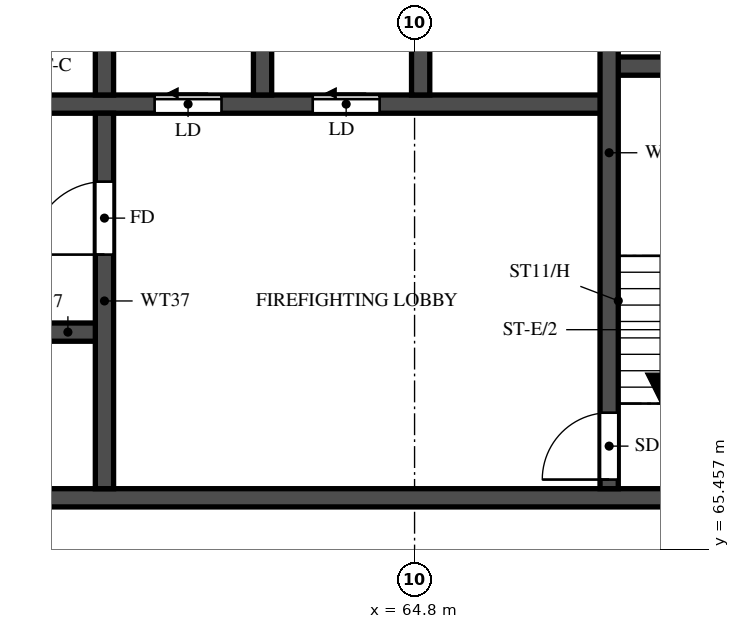
"""IFC4 building model, lengths in metres.
Left out: names, types, materials, properties, quantities, classifications, styles, units other than length and angle.
Written with IfcOpenShell. Run it as: python <this file> out.ifc"""

import sys

from ifc_helpers import new_model, si_unit, direction, frame, frame_2d, origin, place, context, subcontext, project, spatial, rectangle, extrude, element, fill, save


model = new_model("IFC4")
c1 = context("Model", 3, precision=1e-05, world=origin(), true_north=direction((0.0, 1.0)))
c2 = subcontext(c1, "Body", "Model", "MODEL_VIEW")
j1 = project(units=[si_unit("LENGTHUNIT", "METRE"), si_unit("PLANEANGLEUNIT", "RADIAN")], contexts=[c1])
p1 = place(None, origin())
s1 = spatial("IfcSite", under=j1, at=p1, CompositionType="ELEMENT")
p2 = place(p1, origin())
s2 = spatial("IfcBuilding", under=s1, at=p2, CompositionType="ELEMENT")
p3 = place(p2, frame((0.0, 0.0, 222.0)))
s3 = spatial("IfcBuildingStorey", under=s2, at=p3, CompositionType="ELEMENT", Elevation=222.0)
p4 = place(p3, frame((29.2, 66.3, 0.0), z_axis=(0.0, 0.0, 1.0), x_axis=(1.0, 0.0, 0.0)))
e1 = element("IfcWall", 1, at=p4, inside=s3, PredefinedType="SHEAR", context=c2, shape_type="SweptSolid", body=[
    extrude(rectangle(XDim=42.4, YDim=0.3, at=frame_2d((21.2, 0.0))), origin(), (0.0, 0.0, 1.0), 3.22),
])
p5 = place(p4, frame((1.425, 0.0, 0.0)))
e2 = element("IfcOpeningElement", 2, at=p5, cuts=e1, PredefinedType="OPENING", context=c2, shape_type="SweptSolid", body=[
    extrude(rectangle(XDim=1.1, YDim=2.1, at=frame_2d((0.55, 1.05))), frame((0.0, 0.16, 0.0), z_axis=(0.0, -1.0, 0.0), x_axis=(1.0, 0.0, 0.0)), (0.0, 0.0, 1.0), 0.32),
])
p6 = place(p4, frame((4.2, 0.0, 0.0)))
e3 = element("IfcOpeningElement", 3, at=p6, cuts=e1, PredefinedType="OPENING", context=c2, shape_type="SweptSolid", body=[
    extrude(rectangle(XDim=1.8, YDim=2.1, at=frame_2d((0.9, 1.05))), frame((0.0, 0.16, 0.0), z_axis=(0.0, -1.0, 0.0), x_axis=(1.0, 0.0, 0.0)), (0.0, 0.0, 1.0), 0.32),
])
p7 = place(p3, frame((35.65, 69.025, 0.0), z_axis=(0.0, 0.0, 1.0), x_axis=(1.0, 0.0, 0.0)))
e4 = element("IfcWall", 4, at=p7, inside=s3, PredefinedType="SHEAR", context=c2, shape_type="SweptSolid", body=[
    extrude(rectangle(XDim=24.05, YDim=0.3, at=frame_2d((12.025, 0.0))), origin(), (0.0, 0.0, 1.0), 3.22),
])
p8 = place(p7, frame((0.975, 0.0, 0.0)))
e5 = element("IfcOpeningElement", 5, at=p8, cuts=e4, PredefinedType="OPENING", context=c2, shape_type="SweptSolid", body=[
    extrude(rectangle(XDim=1.1, YDim=2.1, at=frame_2d((0.55, 1.05))), frame((0.0, 0.16, 0.0), z_axis=(0.0, -1.0, 0.0), x_axis=(1.0, 0.0, 0.0)), (0.0, 0.0, 1.0), 0.32),
])
p9 = place(p7, frame((3.725, 0.0, 0.0)))
e6 = element("IfcOpeningElement", 6, at=p9, cuts=e4, PredefinedType="OPENING", context=c2, shape_type="SweptSolid", body=[
    extrude(rectangle(XDim=1.1, YDim=2.1, at=frame_2d((0.55, 1.05))), frame((0.0, 0.16, 0.0), z_axis=(0.0, -1.0, 0.0), x_axis=(1.0, 0.0, 0.0)), (0.0, 0.0, 1.0), 0.32),
])
p10 = place(p7, frame((6.475, 0.0, 0.0)))
e7 = element("IfcOpeningElement", 7, at=p10, cuts=e4, PredefinedType="OPENING", context=c2, shape_type="SweptSolid", body=[
    extrude(rectangle(XDim=1.1, YDim=2.1, at=frame_2d((0.55, 1.05))), frame((0.0, 0.16, 0.0), z_axis=(0.0, -1.0, 0.0), x_axis=(1.0, 0.0, 0.0)), (0.0, 0.0, 1.0), 0.32),
])
p11 = place(p7, frame((9.225, 0.0, 0.0)))
e8 = element("IfcOpeningElement", 8, at=p11, cuts=e4, PredefinedType="OPENING", context=c2, shape_type="SweptSolid", body=[
    extrude(rectangle(XDim=1.1, YDim=2.1, at=frame_2d((0.55, 1.05))), frame((0.0, 0.16, 0.0), z_axis=(0.0, -1.0, 0.0), x_axis=(1.0, 0.0, 0.0)), (0.0, 0.0, 1.0), 0.32),
])
p12 = place(p7, frame((11.975, 0.0, 0.0)))
e9 = element("IfcOpeningElement", 9, at=p12, cuts=e4, PredefinedType="OPENING", context=c2, shape_type="SweptSolid", body=[
    extrude(rectangle(XDim=1.1, YDim=2.1, at=frame_2d((0.55, 1.05))), frame((0.0, 0.16, 0.0), z_axis=(0.0, -1.0, 0.0), x_axis=(1.0, 0.0, 0.0)), (0.0, 0.0, 1.0), 0.32),
])
p13 = place(p7, frame((14.725, 0.0, 0.0)))
e10 = element("IfcOpeningElement", 10, at=p13, cuts=e4, PredefinedType="OPENING", context=c2, shape_type="SweptSolid", body=[
    extrude(rectangle(XDim=1.1, YDim=2.1, at=frame_2d((0.55, 1.05))), frame((0.0, 0.16, 0.0), z_axis=(0.0, -1.0, 0.0), x_axis=(1.0, 0.0, 0.0)), (0.0, 0.0, 1.0), 0.32),
])
p14 = place(p7, frame((17.6, 0.0, 0.0)))
e11 = element("IfcOpeningElement", 11, at=p14, cuts=e4, PredefinedType="OPENING", context=c2, shape_type="SweptSolid", body=[
    extrude(rectangle(XDim=1.1, YDim=2.1, at=frame_2d((0.55, 1.05))), frame((0.0, 0.16, 0.0), z_axis=(0.0, -1.0, 0.0), x_axis=(1.0, 0.0, 0.0)), (0.0, 0.0, 1.0), 0.32),
])
p15 = place(p7, frame((20.6, 0.0, 0.0)))
e12 = element("IfcOpeningElement", 12, at=p15, cuts=e4, PredefinedType="OPENING", context=c2, shape_type="SweptSolid", body=[
    extrude(rectangle(XDim=1.1, YDim=2.1, at=frame_2d((0.55, 1.05))), frame((0.0, 0.16, 0.0), z_axis=(0.0, -1.0, 0.0), x_axis=(1.0, 0.0, 0.0)), (0.0, 0.0, 1.0), 0.32),
])
p16 = place(p3, frame((32.8, 72.775, 0.0), z_axis=(0.0, 0.0, 1.0), x_axis=(1.0, 0.0, 0.0)))
e13 = element("IfcWall", 13, at=p16, inside=s3, PredefinedType="SHEAR", context=c2, shape_type="SweptSolid", body=[
    extrude(rectangle(XDim=35.2, YDim=0.3, at=frame_2d((17.6, 0.0))), origin(), (0.0, 0.0, 1.0), 3.22),
])
p17 = place(p16, frame((19.8, 0.0, 0.0)))
e14 = element("IfcOpeningElement", 14, at=p17, cuts=e13, PredefinedType="OPENING", context=c2, shape_type="SweptSolid", body=[
    extrude(rectangle(XDim=1.1, YDim=2.1, at=frame_2d((0.55, 1.05))), frame((0.0, 0.16, 0.0), z_axis=(0.0, -1.0, 0.0), x_axis=(1.0, 0.0, 0.0)), (0.0, 0.0, 1.0), 0.32),
])
p18 = place(p16, frame((27.725, 0.0, 0.0)))
e15 = element("IfcOpeningElement", 15, at=p18, cuts=e13, PredefinedType="OPENING", context=c2, shape_type="SweptSolid", body=[
    extrude(rectangle(XDim=1.1, YDim=2.1, at=frame_2d((0.55, 1.05))), frame((0.0, 0.16, 0.0), z_axis=(0.0, -1.0, 0.0), x_axis=(1.0, 0.0, 0.0)), (0.0, 0.0, 1.0), 0.32),
])
p19 = place(p16, frame((30.325, 0.0, 0.0)))
e16 = element("IfcOpeningElement", 16, at=p19, cuts=e13, PredefinedType="OPENING", context=c2, shape_type="SweptSolid", body=[
    extrude(rectangle(XDim=1.1, YDim=2.1, at=frame_2d((0.55, 1.05))), frame((0.0, 0.16, 0.0), z_axis=(0.0, -1.0, 0.0), x_axis=(1.0, 0.0, 0.0)), (0.0, 0.0, 1.0), 0.32),
])
p20 = place(p16, frame((3.825, 0.0, 0.0)))
e17 = element("IfcOpeningElement", 17, at=p20, cuts=e13, PredefinedType="OPENING", context=c2, shape_type="SweptSolid", body=[
    extrude(rectangle(XDim=1.1, YDim=2.1, at=frame_2d((0.55, 1.05))), frame((0.0, 0.16, 0.0), z_axis=(0.0, -1.0, 0.0), x_axis=(1.0, 0.0, 0.0)), (0.0, 0.0, 1.0), 0.32),
])
p21 = place(p16, frame((6.575, 0.0, 0.0)))
e18 = element("IfcOpeningElement", 18, at=p21, cuts=e13, PredefinedType="OPENING", context=c2, shape_type="SweptSolid", body=[
    extrude(rectangle(XDim=1.1, YDim=2.1, at=frame_2d((0.55, 1.05))), frame((0.0, 0.16, 0.0), z_axis=(0.0, -1.0, 0.0), x_axis=(1.0, 0.0, 0.0)), (0.0, 0.0, 1.0), 0.32),
])
p22 = place(p16, frame((9.325, 0.0, 0.0)))
e19 = element("IfcOpeningElement", 19, at=p22, cuts=e13, PredefinedType="OPENING", context=c2, shape_type="SweptSolid", body=[
    extrude(rectangle(XDim=1.1, YDim=2.1, at=frame_2d((0.55, 1.05))), frame((0.0, 0.16, 0.0), z_axis=(0.0, -1.0, 0.0), x_axis=(1.0, 0.0, 0.0)), (0.0, 0.0, 1.0), 0.32),
])
p23 = place(p16, frame((12.075, 0.0, 0.0)))
e20 = element("IfcOpeningElement", 20, at=p23, cuts=e13, PredefinedType="OPENING", context=c2, shape_type="SweptSolid", body=[
    extrude(rectangle(XDim=1.1, YDim=2.1, at=frame_2d((0.55, 1.05))), frame((0.0, 0.16, 0.0), z_axis=(0.0, -1.0, 0.0), x_axis=(1.0, 0.0, 0.0)), (0.0, 0.0, 1.0), 0.32),
])
p24 = place(p16, frame((14.825, 0.0, 0.0)))
e21 = element("IfcOpeningElement", 21, at=p24, cuts=e13, PredefinedType="OPENING", context=c2, shape_type="SweptSolid", body=[
    extrude(rectangle(XDim=1.1, YDim=2.1, at=frame_2d((0.55, 1.05))), frame((0.0, 0.16, 0.0), z_axis=(0.0, -1.0, 0.0), x_axis=(1.0, 0.0, 0.0)), (0.0, 0.0, 1.0), 0.32),
])
p25 = place(p16, frame((17.575, 0.0, 0.0)))
e22 = element("IfcOpeningElement", 22, at=p25, cuts=e13, PredefinedType="OPENING", context=c2, shape_type="SweptSolid", body=[
    extrude(rectangle(XDim=1.1, YDim=2.1, at=frame_2d((0.55, 1.05))), frame((0.0, 0.16, 0.0), z_axis=(0.0, -1.0, 0.0), x_axis=(1.0, 0.0, 0.0)), (0.0, 0.0, 1.0), 0.32),
])
p26 = place(p16, frame((0.95, 0.0, 0.0)))
e23 = element("IfcOpeningElement", 23, at=p26, cuts=e13, PredefinedType="OPENING", context=c2, shape_type="SweptSolid", body=[
    extrude(rectangle(XDim=1.1, YDim=2.1, at=frame_2d((0.55, 1.05))), frame((0.0, 0.16, 0.0), z_axis=(0.0, -1.0, 0.0), x_axis=(1.0, 0.0, 0.0)), (0.0, 0.0, 1.0), 0.32),
])
p27 = place(p3, frame((68.0, 73.4, 0.0), z_axis=(0.0, 0.0, 1.0), x_axis=(1.0, 0.0, 0.0)))
e24 = element("IfcWall", 24, at=p27, inside=s3, PredefinedType="SHEAR", context=c2, shape_type="SweptSolid", body=[
    extrude(rectangle(XDim=3.1, YDim=0.3, at=frame_2d((1.55, 0.0))), origin(), (0.0, 0.0, 1.0), 3.22),
])
p28 = place(p3, frame((68.0, 66.45, 0.0), z_axis=(0.0, 0.0, 1.0), x_axis=(0.0, 1.0, 0.0)))
e25 = element("IfcWall", 25, at=p28, inside=s3, PredefinedType="SHEAR", context=c2, shape_type="SweptSolid", body=[
    extrude(rectangle(XDim=11.05, YDim=0.3, at=frame_2d((5.525, 0.0))), origin(), (0.0, 0.0, 1.0), 3.22),
])
p29 = place(p28, frame((0.15, 0.0, 0.0)))
e26 = element("IfcOpeningElement", 26, at=p29, cuts=e25, PredefinedType="OPENING", context=c2, shape_type="SweptSolid", body=[
    extrude(rectangle(XDim=1.1, YDim=2.1, at=frame_2d((0.55, 1.05))), frame((0.0, 0.16, 0.0), z_axis=(0.0, -1.0, 0.0), x_axis=(1.0, 0.0, 0.0)), (0.0, 0.0, 1.0), 0.32),
])
p30 = place(p3, frame((59.7, 66.45, 0.0), z_axis=(0.0, 0.0, 1.0), x_axis=(0.0, 1.0, 0.0)))
e27 = element("IfcWall", 27, at=p30, inside=s3, PredefinedType="SHEAR", context=c2, shape_type="SweptSolid", body=[
    extrude(rectangle(XDim=6.175, YDim=0.3, at=frame_2d((3.087, 0.0))), origin(), (0.0, 0.0, 1.0), 3.22),
])
p31 = place(p30, frame((3.85, 0.0, 0.0)))
e28 = element("IfcOpeningElement", 28, at=p31, cuts=e27, PredefinedType="OPENING", context=c2, shape_type="SweptSolid", body=[
    extrude(rectangle(XDim=1.2, YDim=2.1, at=frame_2d((0.6, 1.05))), frame((0.0, 0.16, 0.0), z_axis=(0.0, -1.0, 0.0), x_axis=(1.0, 0.0, 0.0)), (0.0, 0.0, 1.0), 0.32),
])
for number, where, z_axis, x_axis in (
    (29, (59.7, 72.925, 0.0), (0.0, 0.0, 1.0), (0.0, 1.0, 0.0)),
    (30, (62.3, 72.925, 0.0), (0.0, 0.0, 1.0), (0.0, 1.0, 0.0)),
    (31, (64.9, 72.925, 0.0), (0.0, 0.0, 1.0), (0.0, 1.0, 0.0)),
):
    element("IfcWall", number, at=place(p3, frame(where, z_axis=z_axis, x_axis=x_axis)), inside=s3, PredefinedType="SHEAR", context=c2, shape_type="SweptSolid", body=[
        extrude(rectangle(XDim=2.95, YDim=0.3, at=frame_2d((1.475, 0.0))), origin(), (0.0, 0.0, 1.0), 3.22),
    ])
p32 = place(p29, origin())
e32 = element("IfcDoor", 32, at=p32, inside=s3, OperationType="SINGLE_SWING_RIGHT", PredefinedType="DOOR", context=c2, shape_type="SweptSolid", body=[
    extrude(rectangle(XDim=1.1, YDim=2.1, at=frame_2d((0.55, 1.05))), frame((0.0, 0.025, 0.0), z_axis=(0.0, -1.0, 0.0), x_axis=(1.0, 0.0, 0.0)), (0.0, 0.0, 1.0), 0.05),
])
fill(e26, e32)
p33 = place(p31, origin())
e33 = element("IfcDoor", 33, at=p33, inside=s3, OperationType="SINGLE_SWING_LEFT", PredefinedType="DOOR", context=c2, shape_type="SweptSolid", body=[
    extrude(rectangle(XDim=1.2, YDim=2.1, at=frame_2d((0.6, 1.05))), frame((0.0, 0.025, 0.0), z_axis=(0.0, -1.0, 0.0), x_axis=(1.0, 0.0, 0.0)), (0.0, 0.0, 1.0), 0.05),
])
fill(e28, e33)
p34 = place(p18, origin())
e34 = element("IfcDoor", 34, at=p34, inside=s3, OperationType="SLIDING_TO_LEFT", PredefinedType="DOOR", context=c2, shape_type="SweptSolid", body=[
    extrude(rectangle(XDim=1.1, YDim=2.1, at=frame_2d((0.55, 1.05))), frame((0.0, 0.025, 0.0), z_axis=(0.0, -1.0, 0.0), x_axis=(1.0, 0.0, 0.0)), (0.0, 0.0, 1.0), 0.05),
])
fill(e15, e34)
p35 = place(p19, origin())
e35 = element("IfcDoor", 35, at=p35, inside=s3, OperationType="SLIDING_TO_LEFT", PredefinedType="DOOR", context=c2, shape_type="SweptSolid", body=[
    extrude(rectangle(XDim=1.1, YDim=2.1, at=frame_2d((0.55, 1.05))), frame((0.0, 0.025, 0.0), z_axis=(0.0, -1.0, 0.0), x_axis=(1.0, 0.0, 0.0)), (0.0, 0.0, 1.0), 0.05),
])
fill(e16, e35)
save(model, sys.argv[1])
